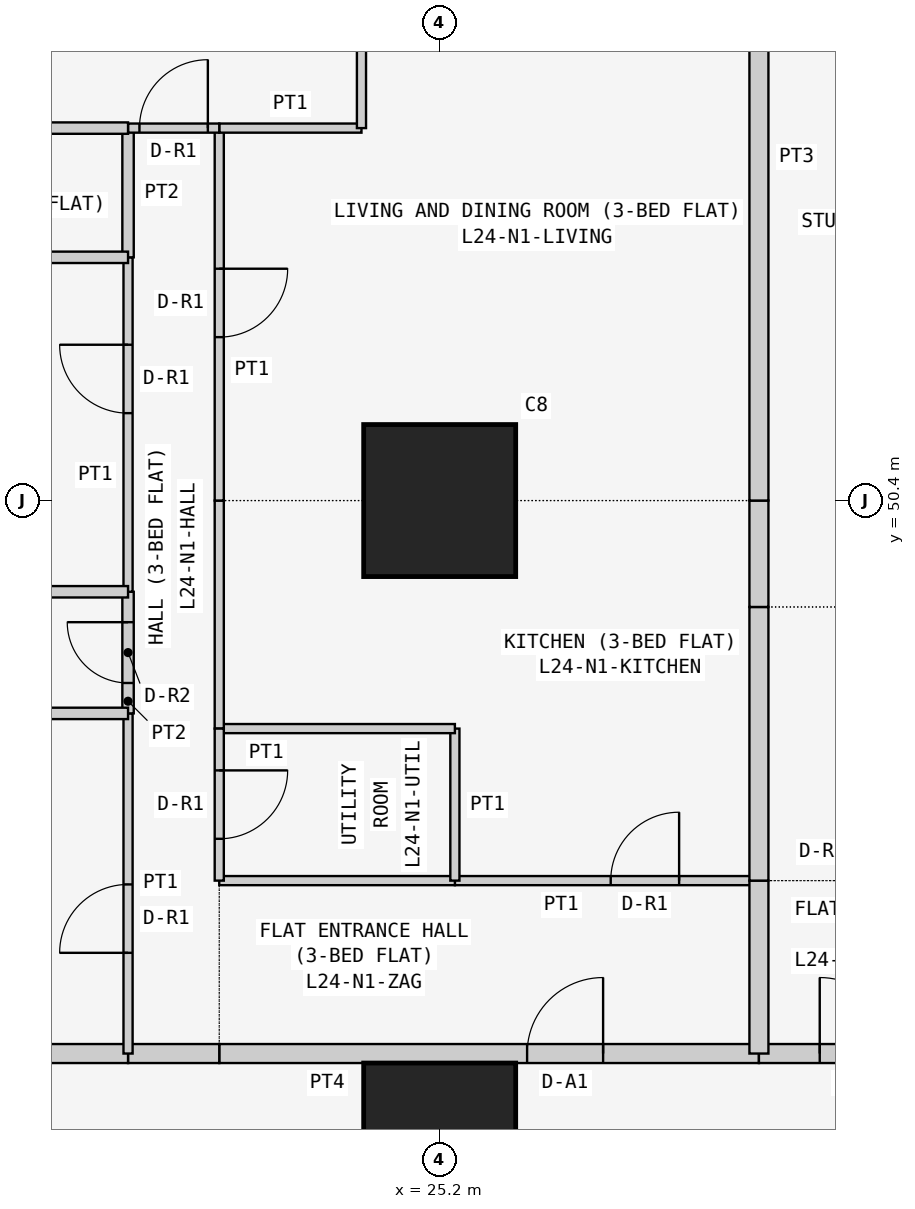
"""IFC4 building model, lengths in metres.
Left out: names, types, materials, properties, quantities, classifications, styles, units other than length and angle.
Written with IfcOpenShell. Run it as: python <this file> out.ifc"""

import sys

from ifc_helpers import new_model, si_unit, direction, frame, frame_2d, origin, origin_2d, place, context, subcontext, project, spatial, rectangle, extrude, element, fill, save


model = new_model("IFC4")
c1 = context("Model", 3, precision=1e-05, world=origin(), true_north=direction((0.0, 1.0)))
c2 = subcontext(c1, "Body", "Model", "MODEL_VIEW")
j1 = project(units=[si_unit("LENGTHUNIT", "METRE"), si_unit("PLANEANGLEUNIT", "RADIAN")], contexts=[c1])
p1 = place(None, origin())
s1 = spatial("IfcSite", under=j1, at=p1, CompositionType="ELEMENT")
p2 = place(p1, origin())
s2 = spatial("IfcBuilding", under=s1, at=p2, CompositionType="ELEMENT")
p3 = place(p2, frame((0.0, 0.0, 95.7)))
s3 = spatial("IfcBuildingStorey", under=s2, at=p3, CompositionType="ELEMENT", Elevation=95.7)
for number, where, z_axis, x_axis in (
    (1, (25.2, 42.0, 0.0), (0.0, 0.0, 1.0), (1.0, 0.0, 0.0)),
    (2, (25.2, 50.4, 0.0), (0.0, 0.0, 1.0), (1.0, 0.0, 0.0)),
):
    element("IfcColumn", number, at=place(p3, frame(where, z_axis=z_axis, x_axis=x_axis)), inside=s3, PredefinedType="COLUMN", context=c2, shape_type="SweptSolid", body=[
        extrude(rectangle(XDim=2.0, YDim=2.0, at=origin_2d()), origin(), (0.0, 0.0, 1.0), 3.6),
    ])
p4 = place(p3, frame((22.3, 43.125, 0.0), z_axis=(0.0, 0.0, 1.0), x_axis=(1.0, 0.0, 0.0)))
e3 = element("IfcWall", 3, at=p4, inside=s3, PredefinedType="PARTITIONING", context=c2, shape_type="SweptSolid", body=[
    extrude(rectangle(XDim=7.1, YDim=0.25, at=frame_2d((3.55, 0.0))), origin(), (0.0, 0.0, 1.0), 3.45),
])
p5 = place(p4, frame((4.05, 0.0, 0.0)))
e4 = element("IfcOpeningElement", 4, at=p5, cuts=e3, PredefinedType="OPENING", context=c2, shape_type="SweptSolid", body=[
    extrude(rectangle(XDim=1.0, YDim=2.1, at=frame_2d((0.5, 1.05))), frame((0.0, 0.135, 0.0), z_axis=(0.0, -1.0, 0.0), x_axis=(1.0, 0.0, 0.0)), (0.0, 0.0, 1.0), 0.27),
])
p6 = place(p3, frame((21.1, 43.125, 0.0), z_axis=(0.0, 0.0, 1.0), x_axis=(1.0, 0.0, 0.0)))
e5 = element("IfcWall", 5, at=p6, inside=s3, PredefinedType="PARTITIONING", context=c2, shape_type="SweptSolid", body=[
    extrude(rectangle(XDim=1.2, YDim=0.25, at=frame_2d((0.6, 0.0))), origin(), (0.0, 0.0, 1.0), 3.45),
])
p7 = place(p3, frame((16.1, 43.125, 0.0), z_axis=(0.0, 0.0, 1.0), x_axis=(1.0, 0.0, 0.0)))
e6 = element("IfcWall", 6, at=p7, inside=s3, PredefinedType="PARTITIONING", context=c2, shape_type="SweptSolid", body=[
    extrude(rectangle(XDim=5.0, YDim=0.25, at=frame_2d((2.5, 0.0))), origin(), (0.0, 0.0, 1.0), 3.45),
])
p8 = place(p3, frame((29.4, 43.125, 0.0), z_axis=(0.0, 0.0, 1.0), x_axis=(1.0, 0.0, 0.0)))
e7 = element("IfcWall", 7, at=p8, inside=s3, PredefinedType="PARTITIONING", context=c2, shape_type="SweptSolid", body=[
    extrude(rectangle(XDim=2.6, YDim=0.25, at=frame_2d((1.3, 0.0))), origin(), (0.0, 0.0, 1.0), 3.45),
])
p9 = place(p8, frame((0.8, 0.0, 0.0)))
e8 = element("IfcOpeningElement", 8, at=p9, cuts=e7, PredefinedType="OPENING", context=c2, shape_type="SweptSolid", body=[
    extrude(rectangle(XDim=1.0, YDim=2.1, at=frame_2d((0.5, 1.05))), frame((0.0, 0.135, 0.0), z_axis=(0.0, -1.0, 0.0), x_axis=(1.0, 0.0, 0.0)), (0.0, 0.0, 1.0), 0.27),
])
p10 = place(p3, frame((29.4, 45.4, 0.0), z_axis=(0.0, 0.0, 1.0), x_axis=(-1.0, 0.0, 0.0)))
e9 = element("IfcWall", 9, at=p10, inside=s3, PredefinedType="PARTITIONING", context=c2, shape_type="SweptSolid", body=[
    extrude(rectangle(XDim=4.0, YDim=0.12, at=frame_2d((2.0, 0.0))), origin(), (0.0, 0.0, 1.0), 3.45),
])
p11 = place(p10, frame((1.05, 0.0, 0.0)))
e10 = element("IfcOpeningElement", 10, at=p11, cuts=e9, PredefinedType="OPENING", context=c2, shape_type="SweptSolid", body=[
    extrude(rectangle(XDim=0.9, YDim=2.1, at=frame_2d((0.45, 1.05))), frame((0.0, 0.07, 0.0), z_axis=(0.0, -1.0, 0.0), x_axis=(1.0, 0.0, 0.0)), (0.0, 0.0, 1.0), 0.14),
])
p12 = place(p3, frame((25.4, 45.4, 0.0), z_axis=(0.0, 0.0, 1.0), x_axis=(-1.0, 0.0, 0.0)))
e11 = element("IfcWall", 11, at=p12, inside=s3, PredefinedType="PARTITIONING", context=c2, shape_type="SweptSolid", body=[
    extrude(rectangle(XDim=3.1, YDim=0.12, at=frame_2d((1.55, 0.0))), origin(), (0.0, 0.0, 1.0), 3.45),
])
p13 = place(p3, frame((29.4, 43.125, 0.0), z_axis=(0.0, 0.0, 1.0), x_axis=(0.0, 1.0, 0.0)))
e12 = element("IfcWall", 12, at=p13, inside=s3, PredefinedType="PARTITIONING", context=c2, shape_type="SweptSolid", body=[
    extrude(rectangle(XDim=2.275, YDim=0.25, at=frame_2d((1.137, 0.0))), origin(), (0.0, 0.0, 1.0), 2.848),
])
p14 = place(p3, frame((25.4, 45.4, 0.0), z_axis=(0.0, 0.0, 1.0), x_axis=(0.0, 1.0, 0.0)))
e13 = element("IfcWall", 13, at=p14, inside=s3, PredefinedType="PARTITIONING", context=c2, shape_type="SweptSolid", body=[
    extrude(rectangle(XDim=2.0, YDim=0.12, at=frame_2d((1.0, 0.0))), origin(), (0.0, 0.0, 1.0), 3.45),
])
p15 = place(p3, frame((25.4, 47.4, 0.0), z_axis=(0.0, 0.0, 1.0), x_axis=(-1.0, 0.0, 0.0)))
e14 = element("IfcWall", 14, at=p15, inside=s3, PredefinedType="PARTITIONING", context=c2, shape_type="SweptSolid", body=[
    extrude(rectangle(XDim=3.1, YDim=0.12, at=frame_2d((1.55, 0.0))), origin(), (0.0, 0.0, 1.0), 3.45),
])
p16 = place(p3, frame((22.3, 47.4, 0.0), z_axis=(0.0, 0.0, 1.0), x_axis=(0.0, 1.0, 0.0)))
e15 = element("IfcWall", 15, at=p16, inside=s3, PredefinedType="PARTITIONING", context=c2, shape_type="SweptSolid", body=[
    extrude(rectangle(XDim=3.0, YDim=0.12, at=frame_2d((1.5, 0.0))), origin(), (0.0, 0.0, 1.0), 3.45),
])
p17 = place(p3, frame((29.4, 49.0, 0.0), z_axis=(0.0, 0.0, 1.0), x_axis=(0.0, -1.0, 0.0)))
e16 = element("IfcWall", 16, at=p17, inside=s3, PredefinedType="PARTITIONING", context=c2, shape_type="SweptSolid", body=[
    extrude(rectangle(XDim=3.6, YDim=0.25, at=frame_2d((1.8, 0.0))), origin(), (0.0, 0.0, 1.0), 2.848),
])
p18 = place(p3, frame((29.4, 50.4, 0.0), z_axis=(0.0, 0.0, 1.0), x_axis=(0.0, -1.0, 0.0)))
e17 = element("IfcWall", 17, at=p18, inside=s3, PredefinedType="PARTITIONING", context=c2, shape_type="SweptSolid", body=[
    extrude(rectangle(XDim=1.4, YDim=0.25, at=frame_2d((0.7, 0.0))), origin(), (0.0, 0.0, 1.0), 2.848),
])
p19 = place(p3, frame((22.3, 47.4, 0.0), z_axis=(0.0, 0.0, 1.0), x_axis=(0.0, -1.0, 0.0)))
e18 = element("IfcWall", 18, at=p19, inside=s3, PredefinedType="PARTITIONING", context=c2, shape_type="SweptSolid", body=[
    extrude(rectangle(XDim=2.0, YDim=0.12, at=frame_2d((1.0, 0.0))), origin(), (0.0, 0.0, 1.0), 3.45),
])
p20 = place(p19, frame((0.55, 0.0, 0.0)))
e19 = element("IfcOpeningElement", 19, at=p20, cuts=e18, PredefinedType="OPENING", context=c2, shape_type="SweptSolid", body=[
    extrude(rectangle(XDim=0.9, YDim=2.1, at=frame_2d((0.45, 1.05))), frame((0.0, 0.07, 0.0), z_axis=(0.0, -1.0, 0.0), x_axis=(1.0, 0.0, 0.0)), (0.0, 0.0, 1.0), 0.14),
])
p21 = place(p3, frame((22.3, 50.4, 0.0), z_axis=(0.0, 0.0, 1.0), x_axis=(0.0, 1.0, 0.0)))
e20 = element("IfcWall", 20, at=p21, inside=s3, PredefinedType="PARTITIONING", context=c2, shape_type="SweptSolid", body=[
    extrude(rectangle(XDim=4.9, YDim=0.12, at=frame_2d((2.45, 0.0))), origin(), (0.0, 0.0, 1.0), 3.45),
])
p22 = place(p21, frame((2.15, 0.0, 0.0)))
e21 = element("IfcOpeningElement", 21, at=p22, cuts=e20, PredefinedType="OPENING", context=c2, shape_type="SweptSolid", body=[
    extrude(rectangle(XDim=0.9, YDim=2.1, at=frame_2d((0.45, 1.05))), frame((0.0, 0.07, 0.0), z_axis=(0.0, -1.0, 0.0), x_axis=(1.0, 0.0, 0.0)), (0.0, 0.0, 1.0), 0.14),
])
p23 = place(p3, frame((22.3, 55.3, 0.0), z_axis=(0.0, 0.0, 1.0), x_axis=(1.0, 0.0, 0.0)))
e22 = element("IfcWall", 22, at=p23, inside=s3, PredefinedType="PARTITIONING", context=c2, shape_type="SweptSolid", body=[
    extrude(rectangle(XDim=1.871, YDim=0.12, at=frame_2d((0.936, 0.0))), origin(), (0.0, 0.0, 1.0), 3.45),
])
p24 = place(p3, frame((24.171, 55.3, 0.0), z_axis=(0.0, 0.0, 1.0), x_axis=(0.0, 1.0, 0.0)))
e23 = element("IfcWall", 23, at=p24, inside=s3, PredefinedType="PARTITIONING", context=c2, shape_type="SweptSolid", body=[
    extrude(rectangle(XDim=4.15, YDim=0.12, at=frame_2d((2.075, 0.0))), origin(), (0.0, 0.0, 1.0), 3.45),
])
p25 = place(p3, frame((29.4, 59.45, 0.0), z_axis=(0.0, 0.0, 1.0), x_axis=(0.0, -1.0, 0.0)))
e24 = element("IfcWall", 24, at=p25, inside=s3, PredefinedType="PARTITIONING", context=c2, shape_type="SweptSolid", body=[
    extrude(rectangle(XDim=9.05, YDim=0.25, at=frame_2d((4.525, 0.0))), origin(), (0.0, 0.0, 1.0), 2.848),
])
p26 = place(p3, frame((21.1, 47.6, 0.0), z_axis=(0.0, 0.0, 1.0), x_axis=(0.0, -1.0, 0.0)))
e25 = element("IfcWall", 25, at=p26, inside=s3, PredefinedType="PARTITIONING", context=c2, shape_type="SweptSolid", body=[
    extrude(rectangle(XDim=4.475, YDim=0.12, at=frame_2d((2.238, 0.0))), origin(), (0.0, 0.0, 1.0), 3.45),
])
p27 = place(p26, frame((2.25, 0.0, 0.0)))
e26 = element("IfcOpeningElement", 26, at=p27, cuts=e25, PredefinedType="OPENING", context=c2, shape_type="SweptSolid", body=[
    extrude(rectangle(XDim=0.9, YDim=2.1, at=frame_2d((0.45, 1.05))), frame((0.0, 0.07, 0.0), z_axis=(0.0, -1.0, 0.0), x_axis=(1.0, 0.0, 0.0)), (0.0, 0.0, 1.0), 0.14),
])
p28 = place(p3, frame((21.1, 49.2, 0.0), z_axis=(0.0, 0.0, 1.0), x_axis=(0.0, -1.0, 0.0)))
e27 = element("IfcWall", 27, at=p28, inside=s3, PredefinedType="PARTITIONING", context=c2, shape_type="SweptSolid", body=[
    extrude(rectangle(XDim=1.6, YDim=0.15, at=frame_2d((0.8, 0.0))), origin(), (0.0, 0.0, 1.0), 3.45),
])
p29 = place(p28, frame((0.4, 0.0, 0.0)))
e28 = element("IfcOpeningElement", 28, at=p29, cuts=e27, PredefinedType="OPENING", context=c2, shape_type="SweptSolid", body=[
    extrude(rectangle(XDim=0.8, YDim=2.1, at=frame_2d((0.4, 1.05))), frame((0.0, 0.085, 0.0), z_axis=(0.0, -1.0, 0.0), x_axis=(1.0, 0.0, 0.0)), (0.0, 0.0, 1.0), 0.17),
])
p30 = place(p3, frame((21.1, 53.6, 0.0), z_axis=(0.0, 0.0, 1.0), x_axis=(0.0, -1.0, 0.0)))
e29 = element("IfcWall", 29, at=p30, inside=s3, PredefinedType="PARTITIONING", context=c2, shape_type="SweptSolid", body=[
    extrude(rectangle(XDim=4.4, YDim=0.12, at=frame_2d((2.2, 0.0))), origin(), (0.0, 0.0, 1.0), 3.45),
])
p31 = place(p30, frame((1.15, 0.0, 0.0)))
e30 = element("IfcOpeningElement", 30, at=p31, cuts=e29, PredefinedType="OPENING", context=c2, shape_type="SweptSolid", body=[
    extrude(rectangle(XDim=0.9, YDim=2.1, at=frame_2d((0.45, 1.05))), frame((0.0, 0.07, 0.0), z_axis=(0.0, -1.0, 0.0), x_axis=(1.0, 0.0, 0.0)), (0.0, 0.0, 1.0), 0.14),
])
p32 = place(p3, frame((21.1, 55.3, 0.0), z_axis=(0.0, 0.0, 1.0), x_axis=(0.0, -1.0, 0.0)))
e31 = element("IfcWall", 31, at=p32, inside=s3, PredefinedType="PARTITIONING", context=c2, shape_type="SweptSolid", body=[
    extrude(rectangle(XDim=1.7, YDim=0.15, at=frame_2d((0.85, 0.0))), origin(), (0.0, 0.0, 1.0), 3.45),
])
p33 = place(p3, frame((22.3, 55.3, 0.0), z_axis=(0.0, 0.0, 1.0), x_axis=(-1.0, 0.0, 0.0)))
e32 = element("IfcWall", 32, at=p33, inside=s3, PredefinedType="PARTITIONING", context=c2, shape_type="SweptSolid", body=[
    extrude(rectangle(XDim=1.2, YDim=0.12, at=frame_2d((0.6, 0.0))), origin(), (0.0, 0.0, 1.0), 3.45),
])
p34 = place(p33, frame((0.15, 0.0, 0.0)))
e33 = element("IfcOpeningElement", 33, at=p34, cuts=e32, PredefinedType="OPENING", context=c2, shape_type="SweptSolid", body=[
    extrude(rectangle(XDim=0.9, YDim=2.1, at=frame_2d((0.45, 1.05))), frame((0.0, 0.07, 0.0), z_axis=(0.0, -1.0, 0.0), x_axis=(1.0, 0.0, 0.0)), (0.0, 0.0, 1.0), 0.14),
])
for number, where, z_axis, x_axis in (
    (34, (21.1, 47.6, 0.0), (0.0, 0.0, 1.0), (-1.0, 0.0, 0.0)),
    (35, (21.1, 49.2, 0.0), (0.0, 0.0, 1.0), (-1.0, 0.0, 0.0)),
    (36, (21.1, 53.6, 0.0), (0.0, 0.0, 1.0), (-1.0, 0.0, 0.0)),
):
    element("IfcWall", number, at=place(p3, frame(where, z_axis=z_axis, x_axis=x_axis)), inside=s3, PredefinedType="PARTITIONING", context=c2, shape_type="SweptSolid", body=[
        extrude(rectangle(XDim=5.0, YDim=0.15, at=frame_2d((2.5, 0.0))), origin(), (0.0, 0.0, 1.0), 3.45),
    ])
p35 = place(p3, frame((21.1, 55.3, 0.0), z_axis=(0.0, 0.0, 1.0), x_axis=(-1.0, 0.0, 0.0)))
e37 = element("IfcWall", 37, at=p35, inside=s3, PredefinedType="PARTITIONING", context=c2, shape_type="SweptSolid", body=[
    extrude(rectangle(XDim=5.0, YDim=0.15, at=frame_2d((2.5, 0.0))), origin(), (0.0, 0.0, 1.0), 3.45),
])
p36 = place(p35, frame((2.3, 0.0, 0.0)))
e38 = element("IfcOpeningElement", 38, at=p36, cuts=e37, PredefinedType="OPENING", context=c2, shape_type="SweptSolid", body=[
    extrude(rectangle(XDim=0.8, YDim=2.1, at=frame_2d((0.4, 1.05))), frame((0.0, 0.085, 0.0), z_axis=(0.0, -1.0, 0.0), x_axis=(1.0, 0.0, 0.0)), (0.0, 0.0, 1.0), 0.17),
])
p37 = place(p5, origin())
e39 = element("IfcDoor", 39, at=p37, inside=s3, OperationType="SINGLE_SWING_RIGHT", PredefinedType="DOOR", context=c2, shape_type="SweptSolid", body=[
    extrude(rectangle(XDim=1.0, YDim=2.1, at=frame_2d((0.5, 1.05))), frame((0.0, 0.025, 0.0), z_axis=(0.0, -1.0, 0.0), x_axis=(1.0, 0.0, 0.0)), (0.0, 0.0, 1.0), 0.05),
])
fill(e4, e39)
p38 = place(p11, frame((0.9, 0.0, 0.0), z_axis=(0.0, 0.0, 1.0), x_axis=(-1.0, 0.0, 0.0)))
e40 = element("IfcDoor", 40, at=p38, inside=s3, OperationType="SINGLE_SWING_RIGHT", PredefinedType="DOOR", context=c2, shape_type="SweptSolid", body=[
    extrude(rectangle(XDim=0.9, YDim=2.1, at=frame_2d((0.45, 1.05))), frame((0.0, 0.025, 0.0), z_axis=(0.0, -1.0, 0.0), x_axis=(1.0, 0.0, 0.0)), (0.0, 0.0, 1.0), 0.05),
])
fill(e10, e40)
p39 = place(p20, origin())
e41 = element("IfcDoor", 41, at=p39, inside=s3, OperationType="SINGLE_SWING_LEFT", PredefinedType="DOOR", context=c2, shape_type="SweptSolid", body=[
    extrude(rectangle(XDim=0.9, YDim=2.1, at=frame_2d((0.45, 1.05))), frame((0.0, 0.025, 0.0), z_axis=(0.0, -1.0, 0.0), x_axis=(1.0, 0.0, 0.0)), (0.0, 0.0, 1.0), 0.05),
])
fill(e19, e41)
p40 = place(p22, frame((0.9, 0.0, 0.0), z_axis=(0.0, 0.0, 1.0), x_axis=(-1.0, 0.0, 0.0)))
e42 = element("IfcDoor", 42, at=p40, inside=s3, OperationType="SINGLE_SWING_LEFT", PredefinedType="DOOR", context=c2, shape_type="SweptSolid", body=[
    extrude(rectangle(XDim=0.9, YDim=2.1, at=frame_2d((0.45, 1.05))), frame((0.0, 0.025, 0.0), z_axis=(0.0, -1.0, 0.0), x_axis=(1.0, 0.0, 0.0)), (0.0, 0.0, 1.0), 0.05),
])
fill(e21, e42)
p41 = place(p27, frame((0.9, 0.0, 0.0), z_axis=(0.0, 0.0, 1.0), x_axis=(-1.0, 0.0, 0.0)))
e43 = element("IfcDoor", 43, at=p41, inside=s3, OperationType="SINGLE_SWING_LEFT", PredefinedType="DOOR", context=c2, shape_type="SweptSolid", body=[
    extrude(rectangle(XDim=0.9, YDim=2.1, at=frame_2d((0.45, 1.05))), frame((0.0, 0.025, 0.0), z_axis=(0.0, -1.0, 0.0), x_axis=(1.0, 0.0, 0.0)), (0.0, 0.0, 1.0), 0.05),
])
fill(e26, e43)
p42 = place(p29, frame((0.8, 0.0, 0.0), z_axis=(0.0, 0.0, 1.0), x_axis=(-1.0, 0.0, 0.0)))
e44 = element("IfcDoor", 44, at=p42, inside=s3, OperationType="SINGLE_SWING_RIGHT", PredefinedType="DOOR", context=c2, shape_type="SweptSolid", body=[
    extrude(rectangle(XDim=0.8, YDim=2.1, at=frame_2d((0.4, 1.05))), frame((0.0, 0.025, 0.0), z_axis=(0.0, -1.0, 0.0), x_axis=(1.0, 0.0, 0.0)), (0.0, 0.0, 1.0), 0.05),
])
fill(e28, e44)
p43 = place(p31, frame((0.9, 0.0, 0.0), z_axis=(0.0, 0.0, 1.0), x_axis=(-1.0, 0.0, 0.0)))
e45 = element("IfcDoor", 45, at=p43, inside=s3, OperationType="SINGLE_SWING_RIGHT", PredefinedType="DOOR", context=c2, shape_type="SweptSolid", body=[
    extrude(rectangle(XDim=0.9, YDim=2.1, at=frame_2d((0.45, 1.05))), frame((0.0, 0.025, 0.0), z_axis=(0.0, -1.0, 0.0), x_axis=(1.0, 0.0, 0.0)), (0.0, 0.0, 1.0), 0.05),
])
fill(e30, e45)
p44 = place(p34, frame((0.9, 0.0, 0.0), z_axis=(0.0, 0.0, 1.0), x_axis=(-1.0, 0.0, 0.0)))
e46 = element("IfcDoor", 46, at=p44, inside=s3, OperationType="SINGLE_SWING_RIGHT", PredefinedType="DOOR", context=c2, shape_type="SweptSolid", body=[
    extrude(rectangle(XDim=0.9, YDim=2.1, at=frame_2d((0.45, 1.05))), frame((0.0, 0.025, 0.0), z_axis=(0.0, -1.0, 0.0), x_axis=(1.0, 0.0, 0.0)), (0.0, 0.0, 1.0), 0.05),
])
fill(e33, e46)
p45 = place(p9, origin())
e47 = element("IfcDoor", 47, at=p45, inside=s3, OperationType="SINGLE_SWING_LEFT", PredefinedType="DOOR", context=c2, shape_type="SweptSolid", body=[
    extrude(rectangle(XDim=1.0, YDim=2.1, at=frame_2d((0.5, 1.05))), frame((0.0, 0.025, 0.0), z_axis=(0.0, -1.0, 0.0), x_axis=(1.0, 0.0, 0.0)), (0.0, 0.0, 1.0), 0.05),
])
fill(e8, e47)
save(model, sys.argv[1])
